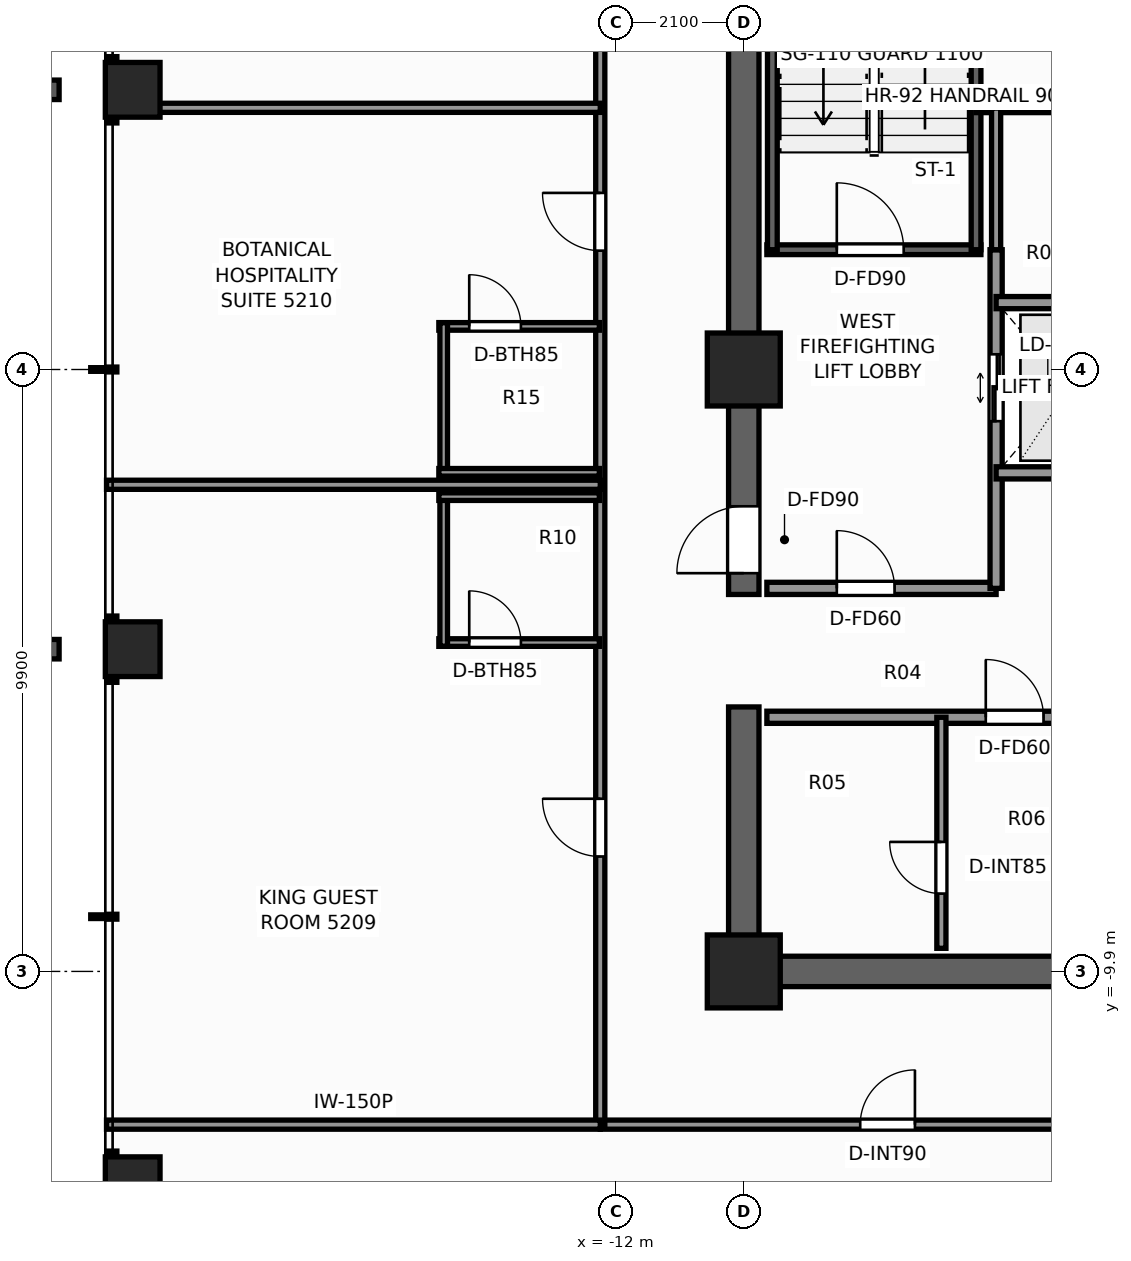
"""IFC4 building model, lengths in metres.
Left out: names, types, materials, properties, quantities, classifications, styles, units other than length and angle.
Written with IfcOpenShell. Run it as: python <this file> out.ifc"""

import sys

from ifc_helpers import new_model, si_unit, direction, frame, frame_2d, origin, origin_2d, place, context, subcontext, project, spatial, rectangle, extrude, element, fill, save


model = new_model("IFC4")
c1 = context("Model", 3, precision=1e-05, world=origin(), true_north=direction((0.0, 1.0)))
c2 = subcontext(c1, "Body", "Model", "MODEL_VIEW")
j1 = project(units=[si_unit("LENGTHUNIT", "METRE"), si_unit("PLANEANGLEUNIT", "RADIAN")], contexts=[c1])
p1 = place(None, origin())
s1 = spatial("IfcSite", under=j1, at=p1, CompositionType="ELEMENT")
p2 = place(p1, origin())
s2 = spatial("IfcBuilding", under=s1, at=p2, CompositionType="ELEMENT")
p3 = place(p2, frame((0.0, 0.0, 180.0)))
s3 = spatial("IfcBuildingStorey", under=s2, at=p3, CompositionType="ELEMENT", Elevation=180.0)
p4 = place(p3, frame((-3.54, -9.9, 0.0), z_axis=(0.0, 0.0, 1.0), x_axis=(-1.0, 0.0, 0.0)))
e1 = element("IfcWall", 1, at=p4, inside=s3, PredefinedType="SHEAR", context=c2, shape_type="SweptSolid", body=[
    extrude(rectangle(XDim=6.61, YDim=0.5, at=frame_2d((3.305, 0.0))), origin(), (0.0, 0.0, 1.0), 3.3),
])
p5 = place(p3, frame((-9.9, -9.65, 0.0), z_axis=(0.0, 0.0, 1.0), x_axis=(0.0, 1.0, 0.0)))
e2 = element("IfcWall", 2, at=p5, inside=s3, PredefinedType="SHEAR", context=c2, shape_type="SweptSolid", body=[
    extrude(rectangle(XDim=4.1, YDim=0.5, at=frame_2d((2.05, 0.0))), origin(), (0.0, 0.0, 1.0), 3.3),
])
p6 = place(p3, frame((-9.9, -3.7, 0.0), z_axis=(0.0, 0.0, 1.0), x_axis=(0.0, 1.0, 0.0)))
e3 = element("IfcWall", 3, at=p6, inside=s3, PredefinedType="SHEAR", context=c2, shape_type="SweptSolid", body=[
    extrude(rectangle(XDim=13.35, YDim=0.5, at=frame_2d((6.675, 0.0))), origin(), (0.0, 0.0, 1.0), 3.3),
])
p7 = place(p6, frame((0.35, 0.0, 0.0)))
e4 = element("IfcOpeningElement", 4, at=p7, cuts=e3, PredefinedType="OPENING", context=c2, shape_type="SweptSolid", body=[
    extrude(rectangle(XDim=1.1, YDim=2.2, at=frame_2d((0.55, 1.1))), frame((0.0, 0.26, 0.0), z_axis=(0.0, -1.0, 0.0), x_axis=(1.0, 0.0, 0.0)), (0.0, 0.0, 1.0), 0.52),
])
for number, where, z_axis, x_axis in (
    (5, (-9.9, -9.9, 0.0), (0.0, 0.0, 1.0), (1.0, 0.0, 0.0)),
    (6, (-9.9, 0.0, 0.0), (0.0, 0.0, 1.0), (1.0, 0.0, 0.0)),
):
    element("IfcColumn", number, at=place(p3, frame(where, z_axis=z_axis, x_axis=x_axis)), inside=s3, PredefinedType="COLUMN", context=c2, shape_type="SweptSolid", body=[
        extrude(rectangle(XDim=1.2, YDim=1.2, at=origin_2d()), origin(), (0.0, 0.0, 1.0), 3.3),
    ])
for number, where, z_axis, x_axis in (
    (7, (-19.95, -13.4, 0.0), (0.0, 0.0, 1.0), (1.0, 0.0, 0.0)),
    (8, (-19.95, -4.6, 0.0), (0.0, 0.0, 1.0), (1.0, 0.0, 0.0)),
    (9, (-19.95, 4.6, 0.0), (0.0, 0.0, 1.0), (1.0, 0.0, 0.0)),
):
    element("IfcColumn", number, at=place(p3, frame(where, z_axis=z_axis, x_axis=x_axis)), inside=s3, PredefinedType="COLUMN", context=c2, shape_type="SweptSolid", body=[
        extrude(rectangle(XDim=0.9, YDim=0.9, at=origin_2d()), origin(), (0.0, 0.0, 1.0), 3.3),
    ])
p8 = place(p3, frame((-9.52, 1.97, 0.0), z_axis=(0.0, 0.0, 1.0), x_axis=(1.0, 0.0, 0.0)))
e10 = element("IfcWall", 10, at=p8, inside=s3, PredefinedType="SHEAR", context=c2, shape_type="SweptSolid", body=[
    extrude(rectangle(XDim=3.52, YDim=0.16, at=frame_2d((1.76, 0.0))), origin(), (0.0, 0.0, 1.0), 3.3),
])
p9 = place(p8, frame((1.15, 0.0, 0.0)))
e11 = element("IfcOpeningElement", 11, at=p9, cuts=e10, PredefinedType="OPENING", context=c2, shape_type="SweptSolid", body=[
    extrude(rectangle(XDim=1.1, YDim=2.2, at=frame_2d((0.55, 1.1))), frame((0.0, 0.09, 0.0), z_axis=(0.0, -1.0, 0.0), x_axis=(1.0, 0.0, 0.0)), (0.0, 0.0, 1.0), 0.18),
])
for number, where, z_axis, x_axis in (
    (12, (-9.43, 1.97, 0.0), (0.0, 0.0, 1.0), (0.0, 1.0, 0.0)),
    (13, (-6.08, 1.97, 0.0), (0.0, 0.0, 1.0), (0.0, 1.0, 0.0)),
):
    element("IfcWall", number, at=place(p3, frame(where, z_axis=z_axis, x_axis=x_axis)), inside=s3, PredefinedType="SHEAR", context=c2, shape_type="SweptSolid", body=[
        extrude(rectangle(XDim=7.56, YDim=0.16, at=frame_2d((3.78, 0.0))), origin(), (0.0, 0.0, 1.0), 3.3),
    ])
p10 = place(p3, frame((-9.52, -3.6, 0.0), z_axis=(0.0, 0.0, 1.0), x_axis=(1.0, 0.0, 0.0)))
e14 = element("IfcWall", 14, at=p10, inside=s3, PredefinedType="SOLIDWALL", context=c2, shape_type="SweptSolid", body=[
    extrude(rectangle(XDim=3.77, YDim=0.2, at=frame_2d((1.885, 0.0))), origin(), (0.0, 0.0, 1.0), 3.08),
])
p11 = place(p10, frame((1.15, 0.0, 0.0)))
e15 = element("IfcOpeningElement", 15, at=p11, cuts=e14, PredefinedType="OPENING", context=c2, shape_type="SweptSolid", body=[
    extrude(rectangle(XDim=0.95, YDim=2.06, at=frame_2d((0.475, 1.03))), frame((0.0, 0.11, 0.0), z_axis=(0.0, -1.0, 0.0), x_axis=(1.0, 0.0, 0.0)), (0.0, 0.0, 1.0), 0.22),
])
p12 = place(p3, frame((-5.75, -3.6, 0.0), z_axis=(0.0, 0.0, 1.0), x_axis=(0.0, 1.0, 0.0)))
e16 = element("IfcWall", 16, at=p12, inside=s3, PredefinedType="SOLIDWALL", context=c2, shape_type="SweptSolid", body=[
    extrude(rectangle(XDim=5.57, YDim=0.2, at=frame_2d((2.785, 0.0))), origin(), (0.0, 0.0, 1.0), 2.715),
])
p13 = place(p12, frame((2.75, 0.0, 0.0)))
e17 = element("IfcOpeningElement", 17, at=p13, cuts=e16, PredefinedType="OPENING", context=c2, shape_type="SweptSolid", body=[
    extrude(rectangle(XDim=1.1, YDim=2.2, at=frame_2d((0.55, 1.1))), frame((0.0, 0.11, 0.0), z_axis=(0.0, -1.0, 0.0), x_axis=(1.0, 0.0, 0.0)), (0.0, 0.0, 1.0), 0.22),
])
for number, where, z_axis, x_axis in (
    (18, (-5.75, -1.7, 0.0), (0.0, 0.0, 1.0), (1.0, 0.0, 0.0)),
    (19, (-5.75, 1.1, 0.0), (0.0, 0.0, 1.0), (1.0, 0.0, 0.0)),
):
    element("IfcWall", number, at=place(p3, frame(where, z_axis=z_axis, x_axis=x_axis)), inside=s3, PredefinedType="SOLIDWALL", context=c2, shape_type="SweptSolid", body=[
        extrude(rectangle(XDim=2.4, YDim=0.2, at=frame_2d((1.2, 0.0))), origin(), (0.0, 0.0, 1.0), 3.08),
    ])
p14 = place(p3, frame((-6.08, 4.3, 0.0), z_axis=(0.0, 0.0, 1.0), x_axis=(1.0, 0.0, 0.0)))
e20 = element("IfcWall", 20, at=p14, inside=s3, PredefinedType="PARTITIONING", context=c2, shape_type="SweptSolid", body=[
    extrude(rectangle(XDim=6.3, YDim=0.15, at=frame_2d((3.15, 0.0))), origin(), (0.0, 0.0, 1.0), 3.08),
])
p15 = place(p3, frame((-9.52, -5.72, 0.0), z_axis=(0.0, 0.0, 1.0), x_axis=(1.0, 0.0, 0.0)))
e21 = element("IfcWall", 21, at=p15, inside=s3, PredefinedType="SOLIDWALL", context=c2, shape_type="SweptSolid", body=[
    extrude(rectangle(XDim=5.66, YDim=0.2, at=frame_2d((2.83, 0.0))), origin(), (0.0, 0.0, 1.0), 3.08),
])
p16 = place(p15, frame((3.6, 0.0, 0.0)))
e22 = element("IfcOpeningElement", 22, at=p16, cuts=e21, PredefinedType="OPENING", context=c2, shape_type="SweptSolid", body=[
    extrude(rectangle(XDim=0.95, YDim=2.06, at=frame_2d((0.475, 1.03))), frame((0.0, 0.11, 0.0), z_axis=(0.0, -1.0, 0.0), x_axis=(1.0, 0.0, 0.0)), (0.0, 0.0, 1.0), 0.22),
])
p17 = place(p3, frame((-6.65, -9.52, 0.0), z_axis=(0.0, 0.0, 1.0), x_axis=(0.0, 1.0, 0.0)))
e23 = element("IfcWall", 23, at=p17, inside=s3, PredefinedType="PARTITIONING", context=c2, shape_type="SweptSolid", body=[
    extrude(rectangle(XDim=3.8, YDim=0.15, at=frame_2d((1.9, 0.0))), origin(), (0.0, 0.0, 1.0), 3.08),
])
p18 = place(p17, frame((0.9, 0.0, 0.0)))
e24 = element("IfcOpeningElement", 24, at=p18, cuts=e23, PredefinedType="OPENING", context=c2, shape_type="SweptSolid", body=[
    extrude(rectangle(XDim=0.85, YDim=2.03, at=frame_2d((0.425, 1.015))), frame((0.0, 0.085, 0.0), z_axis=(0.0, -1.0, 0.0), x_axis=(1.0, 0.0, 0.0)), (0.0, 0.0, 1.0), 0.17),
])
p19 = place(p3, frame((-5.75, 1.97, 0.0), z_axis=(0.0, 0.0, 1.0), x_axis=(0.0, 1.0, 0.0)))
e25 = element("IfcWall", 25, at=p19, inside=s3, PredefinedType="PARTITIONING", context=c2, shape_type="SweptSolid", body=[
    extrude(rectangle(XDim=2.33, YDim=0.15, at=frame_2d((1.165, 0.0))), origin(), (0.0, 0.0, 1.0), 2.715),
])
p20 = place(p3, frame((-12.26, -12.42, 0.0), z_axis=(0.0, 0.0, 1.0), x_axis=(1.0, 0.0, 0.0)))
e26 = element("IfcWall", 26, at=p20, inside=s3, PredefinedType="PARTITIONING", context=c2, shape_type="SweptSolid", body=[
    extrude(rectangle(XDim=24.84, YDim=0.15, at=frame_2d((12.42, 0.0))), origin(), (0.0, 0.0, 1.0), 2.369),
])
p21 = place(p20, frame((4.275, 0.0, 0.0)))
e27 = element("IfcOpeningElement", 27, at=p21, cuts=e26, PredefinedType="OPENING", context=c2, shape_type="SweptSolid", body=[
    extrude(rectangle(XDim=0.9, YDim=2.06, at=frame_2d((0.45, 1.03))), frame((0.0, 0.085, 0.0), z_axis=(0.0, -1.0, 0.0), x_axis=(1.0, 0.0, 0.0)), (0.0, 0.0, 1.0), 0.17),
])
p22 = place(p20, frame((13.84, 0.0, 0.0)))
e28 = element("IfcOpeningElement", 28, at=p22, cuts=e26, PredefinedType="OPENING", context=c2, shape_type="SweptSolid", body=[
    extrude(rectangle(XDim=0.9, YDim=2.06, at=frame_2d((0.45, 1.03))), frame((0.0, 0.085, 0.0), z_axis=(0.0, -1.0, 0.0), x_axis=(1.0, 0.0, 0.0)), (0.0, 0.0, 1.0), 0.17),
])
p23 = place(p20, frame((19.345, 0.0, 0.0)))
e29 = element("IfcOpeningElement", 29, at=p23, cuts=e26, PredefinedType="OPENING", context=c2, shape_type="SweptSolid", body=[
    extrude(rectangle(XDim=0.9, YDim=2.06, at=frame_2d((0.45, 1.03))), frame((0.0, 0.085, 0.0), z_axis=(0.0, -1.0, 0.0), x_axis=(1.0, 0.0, 0.0)), (0.0, 0.0, 1.0), 0.17),
])
p24 = place(p3, frame((-12.26, -12.42, 0.0), z_axis=(0.0, 0.0, 1.0), x_axis=(0.0, 1.0, 0.0)))
e30 = element("IfcWall", 30, at=p24, inside=s3, PredefinedType="PARTITIONING", context=c2, shape_type="SweptSolid", body=[
    extrude(rectangle(XDim=24.84, YDim=0.15, at=frame_2d((12.42, 0.0))), origin(), (0.0, 0.0, 1.0), 2.369),
])
p25 = place(p24, frame((4.41, 0.0, 0.0)))
e31 = element("IfcOpeningElement", 31, at=p25, cuts=e30, PredefinedType="OPENING", context=c2, shape_type="SweptSolid", body=[
    extrude(rectangle(XDim=0.95, YDim=2.06, at=frame_2d((0.475, 1.03))), frame((0.0, 0.085, 0.0), z_axis=(0.0, -1.0, 0.0), x_axis=(1.0, 0.0, 0.0)), (0.0, 0.0, 1.0), 0.17),
])
p26 = place(p24, frame((14.375, 0.0, 0.0)))
e32 = element("IfcOpeningElement", 32, at=p26, cuts=e30, PredefinedType="OPENING", context=c2, shape_type="SweptSolid", body=[
    extrude(rectangle(XDim=0.95, YDim=2.06, at=frame_2d((0.475, 1.03))), frame((0.0, 0.085, 0.0), z_axis=(0.0, -1.0, 0.0), x_axis=(1.0, 0.0, 0.0)), (0.0, 0.0, 1.0), 0.17),
])
p27 = place(p24, frame((18.322, 0.0, 0.0)))
e33 = element("IfcOpeningElement", 33, at=p27, cuts=e30, PredefinedType="OPENING", context=c2, shape_type="SweptSolid", body=[
    extrude(rectangle(XDim=0.9, YDim=2.06, at=frame_2d((0.45, 1.03))), frame((0.0, 0.085, 0.0), z_axis=(0.0, -1.0, 0.0), x_axis=(1.0, 0.0, 0.0)), (0.0, 0.0, 1.0), 0.17),
])
p28 = place(p24, frame((20.442, 0.0, 0.0)))
e34 = element("IfcOpeningElement", 34, at=p28, cuts=e30, PredefinedType="OPENING", context=c2, shape_type="SweptSolid", body=[
    extrude(rectangle(XDim=0.95, YDim=2.06, at=frame_2d((0.475, 1.03))), frame((0.0, 0.085, 0.0), z_axis=(0.0, -1.0, 0.0), x_axis=(1.0, 0.0, 0.0)), (0.0, 0.0, 1.0), 0.17),
])
p29 = place(p3, frame((-20.38, -12.42, 0.0), z_axis=(0.0, 0.0, 1.0), x_axis=(1.0, 0.0, 0.0)))
e35 = element("IfcWall", 35, at=p29, inside=s3, PredefinedType="PARTITIONING", context=c2, shape_type="SweptSolid", body=[
    extrude(rectangle(XDim=8.12, YDim=0.15, at=frame_2d((4.06, 0.0))), origin(), (0.0, 0.0, 1.0), 2.369),
])
p30 = place(p3, frame((-20.38, -1.896, 0.0), z_axis=(0.0, 0.0, 1.0), x_axis=(1.0, 0.0, 0.0)))
e36 = element("IfcWall", 36, at=p30, inside=s3, PredefinedType="PARTITIONING", context=c2, shape_type="SweptSolid", body=[
    extrude(rectangle(XDim=8.12, YDim=0.15, at=frame_2d((4.06, 0.0))), origin(), (0.0, 0.0, 1.0), 2.453),
])
p31 = place(p3, frame((-14.915, -4.491, 0.0), z_axis=(0.0, 0.0, 1.0), x_axis=(1.0, 0.0, 0.0)))
e37 = element("IfcWall", 37, at=p31, inside=s3, PredefinedType="PARTITIONING", context=c2, shape_type="SweptSolid", body=[
    extrude(rectangle(XDim=2.64, YDim=0.125, at=frame_2d((1.32, 0.0))), origin(), (0.0, 0.0, 1.0), 2.369),
])
p32 = place(p31, frame((0.5, 0.0, 0.0)))
e38 = element("IfcOpeningElement", 38, at=p32, cuts=e37, PredefinedType="OPENING", context=c2, shape_type="SweptSolid", body=[
    extrude(rectangle(XDim=0.85, YDim=2.03, at=frame_2d((0.425, 1.015))), frame((0.0, 0.073, 0.0), z_axis=(0.0, -1.0, 0.0), x_axis=(1.0, 0.0, 0.0)), (0.0, 0.0, 1.0), 0.145),
])
p33 = place(p3, frame((-14.835, -4.551, 0.0), z_axis=(0.0, 0.0, 1.0), x_axis=(0.0, 1.0, 0.0)))
e39 = element("IfcWall", 39, at=p33, inside=s3, PredefinedType="PARTITIONING", context=c2, shape_type="SweptSolid", body=[
    extrude(rectangle(XDim=2.52, YDim=0.125, at=frame_2d((1.26, 0.0))), origin(), (0.0, 0.0, 1.0), 2.369),
])
p34 = place(p3, frame((-14.915, -2.091, 0.0), z_axis=(0.0, 0.0, 1.0), x_axis=(1.0, 0.0, 0.0)))
e40 = element("IfcWall", 40, at=p34, inside=s3, PredefinedType="PARTITIONING", context=c2, shape_type="SweptSolid", body=[
    extrude(rectangle(XDim=2.64, YDim=0.125, at=frame_2d((1.32, 0.0))), origin(), (0.0, 0.0, 1.0), 3.08),
])
p35 = place(p3, frame((-20.38, 4.304, 0.0), z_axis=(0.0, 0.0, 1.0), x_axis=(1.0, 0.0, 0.0)))
e41 = element("IfcWall", 41, at=p35, inside=s3, PredefinedType="PARTITIONING", context=c2, shape_type="SweptSolid", body=[
    extrude(rectangle(XDim=8.12, YDim=0.15, at=frame_2d((4.06, 0.0))), origin(), (0.0, 0.0, 1.0), 2.453),
])
p36 = place(p3, frame((-14.915, 0.709, 0.0), z_axis=(0.0, 0.0, 1.0), x_axis=(1.0, 0.0, 0.0)))
e42 = element("IfcWall", 42, at=p36, inside=s3, PredefinedType="PARTITIONING", context=c2, shape_type="SweptSolid", body=[
    extrude(rectangle(XDim=2.64, YDim=0.125, at=frame_2d((1.32, 0.0))), origin(), (0.0, 0.0, 1.0), 3.08),
])
p37 = place(p36, frame((0.5, 0.0, 0.0)))
e43 = element("IfcOpeningElement", 43, at=p37, cuts=e42, PredefinedType="OPENING", context=c2, shape_type="SweptSolid", body=[
    extrude(rectangle(XDim=0.85, YDim=2.03, at=frame_2d((0.425, 1.015))), frame((0.0, 0.073, 0.0), z_axis=(0.0, -1.0, 0.0), x_axis=(1.0, 0.0, 0.0)), (0.0, 0.0, 1.0), 0.145),
])
p38 = place(p3, frame((-14.835, -1.751, 0.0), z_axis=(0.0, 0.0, 1.0), x_axis=(0.0, 1.0, 0.0)))
e44 = element("IfcWall", 44, at=p38, inside=s3, PredefinedType="PARTITIONING", context=c2, shape_type="SweptSolid", body=[
    extrude(rectangle(XDim=2.52, YDim=0.125, at=frame_2d((1.26, 0.0))), origin(), (0.0, 0.0, 1.0), 2.605),
])
p39 = place(p3, frame((-14.915, -1.691, 0.0), z_axis=(0.0, 0.0, 1.0), x_axis=(1.0, 0.0, 0.0)))
e45 = element("IfcWall", 45, at=p39, inside=s3, PredefinedType="PARTITIONING", context=c2, shape_type="SweptSolid", body=[
    extrude(rectangle(XDim=2.64, YDim=0.125, at=frame_2d((1.32, 0.0))), origin(), (0.0, 0.0, 1.0), 3.08),
])
p40 = place(p9, origin())
e46 = element("IfcDoor", 46, at=p40, inside=s3, OperationType="SINGLE_SWING_LEFT", PredefinedType="DOOR", context=c2, shape_type="SweptSolid", body=[
    extrude(rectangle(XDim=1.1, YDim=2.2, at=frame_2d((0.55, 1.1))), frame((0.0, 0.025, 0.0), z_axis=(0.0, -1.0, 0.0), x_axis=(1.0, 0.0, 0.0)), (0.0, 0.0, 1.0), 0.05),
])
fill(e11, e46)
p41 = place(p7, origin())
e47 = element("IfcDoor", 47, at=p41, inside=s3, OperationType="SINGLE_SWING_LEFT", PredefinedType="DOOR", context=c2, shape_type="SweptSolid", body=[
    extrude(rectangle(XDim=1.1, YDim=2.2, at=frame_2d((0.55, 1.1))), frame((0.0, 0.025, 0.0), z_axis=(0.0, -1.0, 0.0), x_axis=(1.0, 0.0, 0.0)), (0.0, 0.0, 1.0), 0.05),
])
fill(e4, e47)
p42 = place(p13, origin())
e48 = element("IfcDoor", 48, at=p42, inside=s3, OperationType="DOUBLE_DOOR_SLIDING", PredefinedType="DOOR", context=c2, shape_type="SweptSolid", body=[
    extrude(rectangle(XDim=1.1, YDim=2.2, at=frame_2d((0.55, 1.1))), frame((0.0, 0.025, 0.0), z_axis=(0.0, -1.0, 0.0), x_axis=(1.0, 0.0, 0.0)), (0.0, 0.0, 1.0), 0.05),
])
fill(e17, e48)
p43 = place(p16, origin())
e49 = element("IfcDoor", 49, at=p43, inside=s3, OperationType="SINGLE_SWING_LEFT", PredefinedType="DOOR", context=c2, shape_type="SweptSolid", body=[
    extrude(rectangle(XDim=0.95, YDim=2.06, at=frame_2d((0.475, 1.03))), frame((0.0, 0.025, 0.0), z_axis=(0.0, -1.0, 0.0), x_axis=(1.0, 0.0, 0.0)), (0.0, 0.0, 1.0), 0.05),
])
fill(e22, e49)
p44 = place(p18, origin())
e50 = element("IfcDoor", 50, at=p44, inside=s3, OperationType="SINGLE_SWING_RIGHT", PredefinedType="DOOR", context=c2, shape_type="SweptSolid", body=[
    extrude(rectangle(XDim=0.85, YDim=2.03, at=frame_2d((0.425, 1.015))), frame((0.0, 0.025, 0.0), z_axis=(0.0, -1.0, 0.0), x_axis=(1.0, 0.0, 0.0)), (0.0, 0.0, 1.0), 0.05),
])
fill(e24, e50)
p45 = place(p11, origin())
e51 = element("IfcDoor", 51, at=p45, inside=s3, OperationType="SINGLE_SWING_LEFT", PredefinedType="DOOR", context=c2, shape_type="SweptSolid", body=[
    extrude(rectangle(XDim=0.95, YDim=2.06, at=frame_2d((0.475, 1.03))), frame((0.0, 0.025, 0.0), z_axis=(0.0, -1.0, 0.0), x_axis=(1.0, 0.0, 0.0)), (0.0, 0.0, 1.0), 0.05),
])
fill(e15, e51)
p46 = place(p21, origin())
e52 = element("IfcDoor", 52, at=p46, inside=s3, OperationType="SINGLE_SWING_RIGHT", PredefinedType="DOOR", context=c2, shape_type="SweptSolid", body=[
    extrude(rectangle(XDim=0.9, YDim=2.06, at=frame_2d((0.45, 1.03))), frame((0.0, 0.025, 0.0), z_axis=(0.0, -1.0, 0.0), x_axis=(1.0, 0.0, 0.0)), (0.0, 0.0, 1.0), 0.05),
])
fill(e27, e52)
p47 = place(p32, origin())
e53 = element("IfcDoor", 53, at=p47, inside=s3, OperationType="SINGLE_SWING_LEFT", PredefinedType="DOOR", context=c2, shape_type="SweptSolid", body=[
    extrude(rectangle(XDim=0.85, YDim=2.03, at=frame_2d((0.425, 1.015))), frame((0.0, 0.025, 0.0), z_axis=(0.0, -1.0, 0.0), x_axis=(1.0, 0.0, 0.0)), (0.0, 0.0, 1.0), 0.05),
])
fill(e38, e53)
p48 = place(p25, origin())
e54 = element("IfcDoor", 54, at=p48, inside=s3, OperationType="SINGLE_SWING_RIGHT", PredefinedType="DOOR", context=c2, shape_type="SweptSolid", body=[
    extrude(rectangle(XDim=0.95, YDim=2.06, at=frame_2d((0.475, 1.03))), frame((0.0, 0.025, 0.0), z_axis=(0.0, -1.0, 0.0), x_axis=(1.0, 0.0, 0.0)), (0.0, 0.0, 1.0), 0.05),
])
fill(e31, e54)
p49 = place(p37, origin())
e55 = element("IfcDoor", 55, at=p49, inside=s3, OperationType="SINGLE_SWING_LEFT", PredefinedType="DOOR", context=c2, shape_type="SweptSolid", body=[
    extrude(rectangle(XDim=0.85, YDim=2.03, at=frame_2d((0.425, 1.015))), frame((0.0, 0.025, 0.0), z_axis=(0.0, -1.0, 0.0), x_axis=(1.0, 0.0, 0.0)), (0.0, 0.0, 1.0), 0.05),
])
fill(e43, e55)
p50 = place(p26, origin())
e56 = element("IfcDoor", 56, at=p50, inside=s3, OperationType="SINGLE_SWING_RIGHT", PredefinedType="DOOR", context=c2, shape_type="SweptSolid", body=[
    extrude(rectangle(XDim=0.95, YDim=2.06, at=frame_2d((0.475, 1.03))), frame((0.0, 0.025, 0.0), z_axis=(0.0, -1.0, 0.0), x_axis=(1.0, 0.0, 0.0)), (0.0, 0.0, 1.0), 0.05),
])
fill(e32, e56)
save(model, sys.argv[1])
